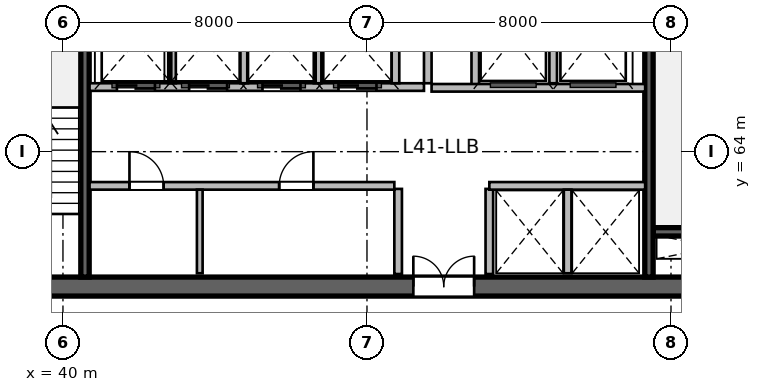
"""IFC4 building model, lengths in metres.
Left out: names, types, materials, properties, quantities, classifications, styles, units other than length and angle.
Written with IfcOpenShell. Run it as: python <this file> out.ifc"""

import sys

from ifc_helpers import new_model, si_unit, direction, frame, frame_2d, origin, place, context, subcontext, project, spatial, rectangle, extrude, source, transform, mapped, element, fill, save


model = new_model("IFC4")
c1 = context("Model", 3, precision=1e-05, world=origin(), true_north=direction((0.0, 1.0)))
c2 = subcontext(c1, "Body", "Model", "MODEL_VIEW")
j1 = project(units=[si_unit("LENGTHUNIT", "METRE"), si_unit("PLANEANGLEUNIT", "RADIAN")], contexts=[c1])
p1 = place(None, origin())
s1 = spatial("IfcSite", under=j1, at=p1, CompositionType="ELEMENT")
p2 = place(p1, origin())
s2 = spatial("IfcBuilding", under=s1, at=p2, CompositionType="ELEMENT")
p3 = place(p2, frame((0.0, 0.0, 170.1)))
s3 = spatial("IfcBuildingStorey", under=s2, at=p3, CompositionType="ELEMENT", Elevation=170.1)
m1 = source(origin(), c2, "Body", "SweptSolid", [
    extrude(rectangle(XDim=21.6, YDim=0.5, at=frame_2d((10.8, 0.0))), origin(), (0.0, 0.0, 1.0), 3.9),
])
p4 = place(p3, frame((37.2, 60.45, 0.0), z_axis=(0.0, 0.0, 1.0), x_axis=(1.0, 0.0, 0.0)))
e1 = element("IfcWall", 1, at=p4, inside=s3, PredefinedType="SHEAR", context=c2, shape_type="MappedRepresentation", body=[
    mapped(m1, transform((0.0, 0.0, 0.0), scale=1.0)),
])
p5 = place(p4, frame((1.1, 0.0, 0.0)))
e2 = element("IfcOpeningElement", 2, at=p5, cuts=e1, PredefinedType="OPENING", context=c2, shape_type="SweptSolid", body=[
    extrude(rectangle(XDim=1.15, YDim=2.15, at=frame_2d((0.575, 1.075))), frame((0.0, 0.26, 0.0), z_axis=(0.0, -1.0, 0.0), x_axis=(1.0, 0.0, 0.0)), (0.0, 0.0, 1.0), 0.52),
])
p6 = place(p4, frame((19.5, 0.0, 0.0)))
e3 = element("IfcOpeningElement", 3, at=p6, cuts=e1, PredefinedType="OPENING", context=c2, shape_type="SweptSolid", body=[
    extrude(rectangle(XDim=0.9, YDim=2.1, at=frame_2d((0.45, 1.05))), frame((0.0, 0.26, 0.0), z_axis=(0.0, -1.0, 0.0), x_axis=(1.0, 0.0, 0.0)), (0.0, 0.0, 1.0), 0.52),
])
p7 = place(p4, frame((12.02, 0.0, 0.0)))
e4 = element("IfcOpeningElement", 4, at=p7, cuts=e1, PredefinedType="OPENING", context=c2, shape_type="SweptSolid", body=[
    extrude(rectangle(XDim=1.6, YDim=2.15, at=frame_2d((0.8, 1.075))), frame((0.0, 0.26, 0.0), z_axis=(0.0, -1.0, 0.0), x_axis=(1.0, 0.0, 0.0)), (0.0, 0.0, 1.0), 0.52),
])
m2 = source(origin(), c2, "Body", "SweptSolid", [
    extrude(rectangle(XDim=3.27, YDim=0.22, at=frame_2d((1.635, 0.0))), origin(), (0.0, 0.0, 1.0), 3.9),
])
p8 = place(p3, frame((55.53, 61.89, 0.0), z_axis=(0.0, 0.0, 1.0), x_axis=(1.0, 0.0, 0.0)))
e5 = element("IfcWall", 5, at=p8, inside=s3, PredefinedType="SHEAR", context=c2, shape_type="MappedRepresentation", body=[
    mapped(m2, transform((0.0, 0.0, 0.0), scale=1.0)),
])
m3 = source(origin(), c2, "Body", "SweptSolid", [
    extrude(rectangle(XDim=11.0, YDim=0.22, at=frame_2d((5.5, 0.0))), origin(), (0.0, 0.0, 1.0), 3.9),
])
p9 = place(p3, frame((40.58, 60.7, 0.0), z_axis=(0.0, 0.0, 1.0), x_axis=(0.0, 1.0, 0.0)))
e6 = element("IfcWall", 6, at=p9, inside=s3, PredefinedType="SHEAR", context=c2, shape_type="MappedRepresentation", body=[
    mapped(m3, transform((0.0, 0.0, 0.0), scale=1.0)),
])
p10 = place(p3, frame((55.42, 60.7, 0.0), z_axis=(0.0, 0.0, 1.0), x_axis=(0.0, 1.0, 0.0)))
e7 = element("IfcWall", 7, at=p10, inside=s3, PredefinedType="SHEAR", context=c2, shape_type="MappedRepresentation", body=[
    mapped(m3, transform((0.0, 0.0, 0.0), scale=1.0)),
])
p11 = place(p10, frame((9.545, 0.0, 0.0)))
e8 = element("IfcOpeningElement", 8, at=p11, cuts=e7, PredefinedType="OPENING", context=c2, shape_type="SweptSolid", body=[
    extrude(rectangle(XDim=1.15, YDim=2.15, at=frame_2d((0.575, 1.075))), frame((0.0, 0.12, 0.0), z_axis=(0.0, -1.0, 0.0), x_axis=(1.0, 0.0, 0.0)), (0.0, 0.0, 1.0), 0.24),
])
m4 = source(origin(), c2, "Body", "SweptSolid", [
    extrude(rectangle(XDim=2.24, YDim=0.2, at=frame_2d((1.12, 0.0))), origin(), (0.0, 0.0, 1.0), 3.65),
])
for number, where, z_axis, x_axis in (
    (9, (48.82, 60.78, 0.0), (0.0, 0.0, 1.0), (0.0, 1.0, 0.0)),
    (10, (51.22, 60.78, 0.0), (0.0, 0.0, 1.0), (0.0, 1.0, 0.0)),
):
    element("IfcWall", number, at=place(p3, frame(where, z_axis=z_axis, x_axis=x_axis)), inside=s3, PredefinedType="SOLIDWALL", context=c2, shape_type="MappedRepresentation", body=[
        mapped(m4, transform((0.0, 0.0, 0.0), scale=1.0)),
    ])
m5 = source(origin(), c2, "Body", "SweptSolid", [
    extrude(rectangle(XDim=5.8, YDim=0.2, at=frame_2d((2.9, 0.0))), origin(), (0.0, 0.0, 1.0), 3.65),
])
p12 = place(p3, frame((49.6, 65.8, 0.0), z_axis=(0.0, 0.0, 1.0), x_axis=(0.0, 1.0, 0.0)))
e11 = element("IfcWall", 11, at=p12, inside=s3, PredefinedType="SOLIDWALL", context=c2, shape_type="MappedRepresentation", body=[
    mapped(m5, transform((0.0, 0.0, 0.0), scale=1.0)),
])
m6 = source(origin(), c2, "Body", "SweptSolid", [
    extrude(rectangle(XDim=2.58, YDim=0.2, at=frame_2d((1.29, 0.0))), origin(), (0.0, 0.0, 1.0), 3.65),
])
p13 = place(p3, frame((50.85, 65.68, 0.0), z_axis=(0.0, 0.0, 1.0), x_axis=(0.0, 1.0, 0.0)))
e12 = element("IfcWall", 12, at=p13, inside=s3, PredefinedType="SOLIDWALL", context=c2, shape_type="MappedRepresentation", body=[
    mapped(m6, transform((0.0, 0.0, 0.0), scale=1.0)),
])
m7 = source(origin(), c2, "Body", "SweptSolid", [
    extrude(rectangle(XDim=2.4, YDim=0.2, at=frame_2d((1.2, 0.0))), origin(), (0.0, 0.0, 1.0), 3.65),
])
p14 = place(p3, frame((52.9, 65.8, 0.0), z_axis=(0.0, 0.0, 1.0), x_axis=(0.0, 1.0, 0.0)))
e13 = element("IfcWall", 13, at=p14, inside=s3, PredefinedType="SOLIDWALL", context=c2, shape_type="MappedRepresentation", body=[
    mapped(m7, transform((0.0, 0.0, 0.0), scale=1.0)),
])
m8 = source(origin(), c2, "Body", "SweptSolid", [
    extrude(rectangle(XDim=5.62, YDim=0.2, at=frame_2d((2.81, 0.0))), origin(), (0.0, 0.0, 1.0), 3.65),
])
p15 = place(p3, frame((49.7, 65.68, 0.0), z_axis=(0.0, 0.0, 1.0), x_axis=(1.0, 0.0, 0.0)))
e14 = element("IfcWall", 14, at=p15, inside=s3, PredefinedType="SOLIDWALL", context=c2, shape_type="MappedRepresentation", body=[
    mapped(m8, transform((0.0, 0.0, 0.0), scale=1.0)),
])
m9 = source(origin(), c2, "Body", "SweptSolid", [
    extrude(rectangle(XDim=8.02, YDim=0.2, at=frame_2d((4.01, 0.0))), origin(), (0.0, 0.0, 1.0), 3.65),
])
p16 = place(p3, frame((40.7, 63.1, 0.0), z_axis=(0.0, 0.0, 1.0), x_axis=(1.0, 0.0, 0.0)))
e15 = element("IfcWall", 15, at=p16, inside=s3, PredefinedType="SOLIDWALL", context=c2, shape_type="MappedRepresentation", body=[
    mapped(m9, transform((0.0, 0.0, 0.0), scale=1.0)),
])
p17 = place(p16, frame((1.05, 0.0, 0.0)))
e16 = element("IfcOpeningElement", 16, at=p17, cuts=e15, PredefinedType="OPENING", context=c2, shape_type="SweptSolid", body=[
    extrude(rectangle(XDim=0.9, YDim=2.1, at=frame_2d((0.45, 1.05))), frame((0.0, 0.11, 0.0), z_axis=(0.0, -1.0, 0.0), x_axis=(1.0, 0.0, 0.0)), (0.0, 0.0, 1.0), 0.22),
])
p18 = place(p16, frame((4.99, 0.0, 0.0)))
e17 = element("IfcOpeningElement", 17, at=p18, cuts=e15, PredefinedType="OPENING", context=c2, shape_type="SweptSolid", body=[
    extrude(rectangle(XDim=0.9, YDim=2.1, at=frame_2d((0.45, 1.05))), frame((0.0, 0.11, 0.0), z_axis=(0.0, -1.0, 0.0), x_axis=(1.0, 0.0, 0.0)), (0.0, 0.0, 1.0), 0.22),
])
m10 = source(origin(), c2, "Body", "SweptSolid", [
    extrude(rectangle(XDim=4.1, YDim=0.2, at=frame_2d((2.05, 0.0))), origin(), (0.0, 0.0, 1.0), 3.65),
])
p19 = place(p3, frame((51.22, 63.1, 0.0), z_axis=(0.0, 0.0, 1.0), x_axis=(1.0, 0.0, 0.0)))
e18 = element("IfcWall", 18, at=p19, inside=s3, PredefinedType="SOLIDWALL", context=c2, shape_type="MappedRepresentation", body=[
    mapped(m10, transform((0.0, 0.0, 0.0), scale=1.0)),
])
m11 = source(origin(), c2, "Body", "SweptSolid", [
    extrude(rectangle(XDim=2.2, YDim=0.15, at=frame_2d((1.1, 0.0))), origin(), (0.0, 0.0, 1.0), 3.65),
])
p20 = place(p3, frame((43.6, 60.8, 0.0), z_axis=(0.0, 0.0, 1.0), x_axis=(0.0, 1.0, 0.0)))
e19 = element("IfcWall", 19, at=p20, inside=s3, PredefinedType="PARTITIONING", context=c2, shape_type="MappedRepresentation", body=[
    mapped(m11, transform((0.0, 0.0, 0.0), scale=1.0)),
])
m12 = source(origin(), c2, "Body", "SweptSolid", [
    extrude(rectangle(XDim=2.2, YDim=0.2, at=frame_2d((1.1, 0.0))), origin(), (0.0, 0.0, 1.0), 3.65),
])
p21 = place(p3, frame((53.28, 60.8, 0.0), z_axis=(0.0, 0.0, 1.0), x_axis=(0.0, 1.0, 0.0)))
e20 = element("IfcWall", 20, at=p21, inside=s3, PredefinedType="SOLIDWALL", context=c2, shape_type="MappedRepresentation", body=[
    mapped(m12, transform((0.0, 0.0, 0.0), scale=1.0)),
])
m13 = source(origin(), c2, "Body", "SweptSolid", [
    extrude(rectangle(XDim=8.8, YDim=0.2, at=frame_2d((4.4, 0.0))), origin(), (0.0, 0.0, 1.0), 3.65),
])
p22 = place(p3, frame((40.7, 65.7, 0.0), z_axis=(0.0, 0.0, 1.0), x_axis=(1.0, 0.0, 0.0)))
e21 = element("IfcWall", 21, at=p22, inside=s3, PredefinedType="SOLIDWALL", context=c2, shape_type="MappedRepresentation", body=[
    mapped(m13, transform((0.0, 0.0, 0.0), scale=1.0)),
])
p23 = place(p22, frame((0.72, 0.0, 0.0)))
e22 = element("IfcOpeningElement", 22, at=p23, cuts=e21, PredefinedType="OPENING", context=c2, shape_type="SweptSolid", body=[
    extrude(rectangle(XDim=1.0, YDim=2.15, at=frame_2d((0.5, 1.075))), frame((0.0, 0.11, 0.0), z_axis=(0.0, -1.0, 0.0), x_axis=(1.0, 0.0, 0.0)), (0.0, 0.0, 1.0), 0.22),
])
p24 = place(p22, frame((2.62, 0.0, 0.0)))
e23 = element("IfcOpeningElement", 23, at=p24, cuts=e21, PredefinedType="OPENING", context=c2, shape_type="SweptSolid", body=[
    extrude(rectangle(XDim=1.0, YDim=2.15, at=frame_2d((0.5, 1.075))), frame((0.0, 0.11, 0.0), z_axis=(0.0, -1.0, 0.0), x_axis=(1.0, 0.0, 0.0)), (0.0, 0.0, 1.0), 0.22),
])
p25 = place(p22, frame((4.55, 0.0, 0.0)))
e24 = element("IfcOpeningElement", 24, at=p25, cuts=e21, PredefinedType="OPENING", context=c2, shape_type="SweptSolid", body=[
    extrude(rectangle(XDim=1.0, YDim=2.15, at=frame_2d((0.5, 1.075))), frame((0.0, 0.11, 0.0), z_axis=(0.0, -1.0, 0.0), x_axis=(1.0, 0.0, 0.0)), (0.0, 0.0, 1.0), 0.22),
])
p26 = place(p22, frame((6.55, 0.0, 0.0)))
e25 = element("IfcOpeningElement", 25, at=p26, cuts=e21, PredefinedType="OPENING", context=c2, shape_type="SweptSolid", body=[
    extrude(rectangle(XDim=1.0, YDim=2.15, at=frame_2d((0.5, 1.075))), frame((0.0, 0.11, 0.0), z_axis=(0.0, -1.0, 0.0), x_axis=(1.0, 0.0, 0.0)), (0.0, 0.0, 1.0), 0.22),
])
for number, where, z_axis, x_axis in (
    (26, (48.75, 65.8, 0.0), (0.0, 0.0, 1.0), (0.0, 1.0, 0.0)),
    (27, (42.87, 65.8, 0.0), (0.0, 0.0, 1.0), (0.0, 1.0, 0.0)),
    (28, (44.77, 65.8, 0.0), (0.0, 0.0, 1.0), (0.0, 1.0, 0.0)),
    (29, (46.7, 65.8, 0.0), (0.0, 0.0, 1.0), (0.0, 1.0, 0.0)),
):
    element("IfcWall", number, at=place(p3, frame(where, z_axis=z_axis, x_axis=x_axis)), inside=s3, PredefinedType="SOLIDWALL", context=c2, shape_type="MappedRepresentation", body=[
        mapped(m7, transform((0.0, 0.0, 0.0), scale=1.0)),
    ])
m14 = source(origin(), c2, "Body", "SweptSolid", [
    extrude(rectangle(XDim=1.6, YDim=2.15, at=frame_2d((0.8, 1.075))), frame((0.0, 0.025, 0.0), z_axis=(0.0, -1.0, 0.0), x_axis=(1.0, 0.0, 0.0)), (0.0, 0.0, 1.0), 0.05),
])
p27 = place(p7, origin())
e30 = element("IfcDoor", 30, at=p27, inside=s3, OperationType="DOUBLE_DOOR_SINGLE_SWING", PredefinedType="DOOR", context=c2, shape_type="MappedRepresentation", body=[
    mapped(m14, transform((0.0, 0.0, 0.0), scale=1.0)),
])
fill(e4, e30)
m15 = source(origin(), c2, "Body", "SweptSolid", [
    extrude(rectangle(XDim=0.9, YDim=2.1, at=frame_2d((0.45, 1.05))), frame((0.0, 0.025, 0.0), z_axis=(0.0, -1.0, 0.0), x_axis=(1.0, 0.0, 0.0)), (0.0, 0.0, 1.0), 0.05),
])
p28 = place(p17, origin())
e31 = element("IfcDoor", 31, at=p28, inside=s3, OperationType="SINGLE_SWING_LEFT", PredefinedType="DOOR", context=c2, shape_type="MappedRepresentation", body=[
    mapped(m15, transform((0.0, 0.0, 0.0), scale=1.0)),
])
fill(e16, e31)
p29 = place(p18, origin())
e32 = element("IfcDoor", 32, at=p29, inside=s3, OperationType="SINGLE_SWING_RIGHT", PredefinedType="DOOR", context=c2, shape_type="MappedRepresentation", body=[
    mapped(m15, transform((0.0, 0.0, 0.0), scale=1.0)),
])
fill(e17, e32)
m16 = source(origin(), c2, "Body", "SweptSolid", [
    extrude(rectangle(XDim=1.0, YDim=2.15, at=frame_2d((0.5, 1.075))), frame((0.0, 0.025, 0.0), z_axis=(0.0, -1.0, 0.0), x_axis=(1.0, 0.0, 0.0)), (0.0, 0.0, 1.0), 0.05),
])
p30 = place(p23, origin())
e33 = element("IfcDoor", 33, at=p30, inside=s3, OperationType="DOUBLE_DOOR_SLIDING", PredefinedType="DOOR", context=c2, shape_type="MappedRepresentation", body=[
    mapped(m16, transform((0.0, 0.0, 0.0), scale=1.0)),
])
fill(e22, e33)
p31 = place(p24, origin())
e34 = element("IfcDoor", 34, at=p31, inside=s3, OperationType="DOUBLE_DOOR_SLIDING", PredefinedType="DOOR", context=c2, shape_type="MappedRepresentation", body=[
    mapped(m16, transform((0.0, 0.0, 0.0), scale=1.0)),
])
fill(e23, e34)
p32 = place(p25, origin())
e35 = element("IfcDoor", 35, at=p32, inside=s3, OperationType="DOUBLE_DOOR_SLIDING", PredefinedType="DOOR", context=c2, shape_type="MappedRepresentation", body=[
    mapped(m16, transform((0.0, 0.0, 0.0), scale=1.0)),
])
fill(e24, e35)
p33 = place(p26, origin())
e36 = element("IfcDoor", 36, at=p33, inside=s3, OperationType="DOUBLE_DOOR_SLIDING", PredefinedType="DOOR", context=c2, shape_type="MappedRepresentation", body=[
    mapped(m16, transform((0.0, 0.0, 0.0), scale=1.0)),
])
fill(e25, e36)
save(model, sys.argv[1])
